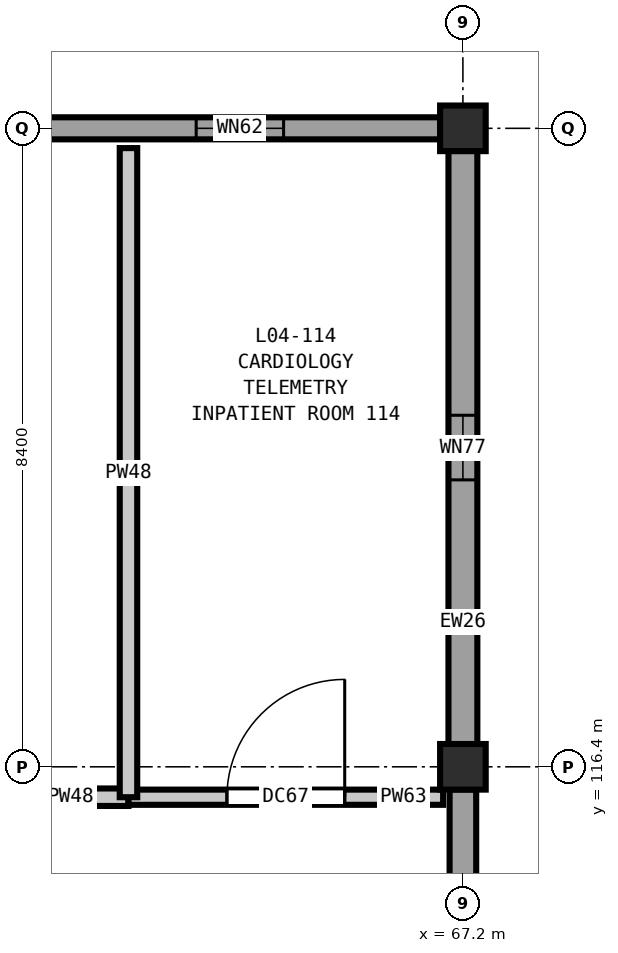
"""IFC4 building model, lengths in metres.
Left out: names, types, materials, properties, quantities, classifications, styles, units other than length and angle.
Written with IfcOpenShell. Run it as: python <this file> out.ifc"""

import sys

from ifc_helpers import new_model, si_unit, direction, frame, frame_2d, origin, origin_2d, place, context, subcontext, project, spatial, rectangle, extrude, element, fill, save


model = new_model("IFC4")
c1 = context("Model", 3, precision=1e-05, world=origin(), true_north=direction((0.0, 1.0)))
c2 = subcontext(c1, "Body", "Model", "MODEL_VIEW")
j1 = project(units=[si_unit("LENGTHUNIT", "METRE"), si_unit("PLANEANGLEUNIT", "RADIAN")], contexts=[c1])
p1 = place(None, origin())
s1 = spatial("IfcSite", under=j1, at=p1, CompositionType="ELEMENT")
p2 = place(p1, origin())
s2 = spatial("IfcBuilding", under=s1, at=p2, CompositionType="ELEMENT")
p3 = place(p2, frame((0.0, 0.0, 20.4)))
s3 = spatial("IfcBuildingStorey", under=s2, at=p3, CompositionType="ELEMENT", Elevation=20.4)
for number, where, z_axis, x_axis in (
    (1, (67.2, 116.4, 0.0), (0.0, 0.0, 1.0), (1.0, 0.0, 0.0)),
    (2, (67.2, 124.8, 0.0), (0.0, 0.0, 1.0), (1.0, 0.0, 0.0)),
):
    element("IfcColumn", number, at=place(p3, frame(where, z_axis=z_axis, x_axis=x_axis)), inside=s3, PredefinedType="COLUMN", context=c2, shape_type="SweptSolid", body=[
        extrude(rectangle(XDim=0.6, YDim=0.6, at=origin_2d()), origin(), (0.0, 0.0, 1.0), 4.2),
    ])
p4 = place(p3, frame((59.098, 124.8, 0.0), z_axis=(0.0, 0.0, 1.0), x_axis=(1.0, 0.0, 0.0)))
e3 = element("IfcWall", 3, at=p4, inside=s3, PredefinedType="SOLIDWALL", context=c2, shape_type="SweptSolid", body=[
    extrude(rectangle(XDim=7.804, YDim=0.29, at=frame_2d((3.902, 0.0))), origin(), (0.0, 0.0, 1.0), 3.48),
])
p5 = place(p4, frame((4.593, 0.0, 0.9)))
e4 = element("IfcOpeningElement", 4, at=p5, cuts=e3, PredefinedType="OPENING", context=c2, shape_type="SweptSolid", body=[
    extrude(rectangle(XDim=1.15, YDim=1.4, at=frame_2d((0.575, 0.7))), frame((0.0, 0.155, 0.0), z_axis=(0.0, -1.0, 0.0), x_axis=(1.0, 0.0, 0.0)), (0.0, 0.0, 1.0), 0.31),
])
p6 = place(p3, frame((67.2, 124.502, 0.0), z_axis=(0.0, 0.0, 1.0), x_axis=(0.0, -1.0, 0.0)))
e5 = element("IfcWall", 5, at=p6, inside=s3, PredefinedType="SOLIDWALL", context=c2, shape_type="SweptSolid", body=[
    extrude(rectangle(XDim=7.804, YDim=0.38, at=frame_2d((3.902, 0.0))), origin(), (0.0, 0.0, 1.0), 3.48),
])
p7 = place(p6, frame((3.477, 0.0, 0.9)))
e6 = element("IfcOpeningElement", 6, at=p7, cuts=e5, PredefinedType="OPENING", context=c2, shape_type="SweptSolid", body=[
    extrude(rectangle(XDim=0.85, YDim=1.4, at=frame_2d((0.425, 0.7))), frame((0.0, 0.2, 0.0), z_axis=(0.0, -1.0, 0.0), x_axis=(1.0, 0.0, 0.0)), (0.0, 0.0, 1.0), 0.4),
])
p8 = place(p3, frame((67.2, 116.102, 0.0), z_axis=(0.0, 0.0, 1.0), x_axis=(0.0, -1.0, 0.0)))
e7 = element("IfcWall", 7, at=p8, inside=s3, PredefinedType="SOLIDWALL", context=c2, shape_type="SweptSolid", body=[
    extrude(rectangle(XDim=6.604, YDim=0.35, at=frame_2d((3.302, 0.0))), origin(), (0.0, 0.0, 1.0), 3.48),
])
p9 = place(p8, frame((2.827, 0.0, 0.9)))
e8 = element("IfcOpeningElement", 8, at=p9, cuts=e7, PredefinedType="OPENING", context=c2, shape_type="SweptSolid", body=[
    extrude(rectangle(XDim=0.95, YDim=1.4, at=frame_2d((0.475, 0.7))), frame((0.0, 0.185, 0.0), z_axis=(0.0, -1.0, 0.0), x_axis=(1.0, 0.0, 0.0)), (0.0, 0.0, 1.0), 0.37),
])
p10 = place(p3, frame((57.8, 116.0, 0.0), z_axis=(0.0, 0.0, 1.0), x_axis=(1.0, 0.0, 0.0)))
e9 = element("IfcWall", 9, at=p10, inside=s3, PredefinedType="PARTITIONING", context=c2, shape_type="SweptSolid", body=[
    extrude(rectangle(XDim=5.0, YDim=0.23, at=frame_2d((2.5, 0.0))), origin(), (0.0, 0.0, 1.0), 3.82),
])
p11 = place(p10, frame((1.775, 0.0, 0.0)))
e10 = element("IfcOpeningElement", 10, at=p11, cuts=e9, PredefinedType="OPENING", context=c2, shape_type="SweptSolid", body=[
    extrude(rectangle(XDim=1.45, YDim=2.25, at=frame_2d((0.725, 1.125))), frame((0.0, 0.125, 0.0), z_axis=(0.0, -1.0, 0.0), x_axis=(1.0, 0.0, 0.0)), (0.0, 0.0, 1.0), 0.25),
])
p12 = place(p3, frame((62.8, 116.0, 0.0), z_axis=(0.0, 0.0, 1.0), x_axis=(1.0, 0.0, 0.0)))
e11 = element("IfcWall", 11, at=p12, inside=s3, PredefinedType="PARTITIONING", context=c2, shape_type="SweptSolid", body=[
    extrude(rectangle(XDim=4.14, YDim=0.2, at=frame_2d((2.07, 0.0))), origin(), (0.0, 0.0, 1.0), 3.82),
])
p13 = place(p12, frame((1.295, 0.0, 0.0)))
e12 = element("IfcOpeningElement", 12, at=p13, cuts=e11, PredefinedType="OPENING", context=c2, shape_type="SweptSolid", body=[
    extrude(rectangle(XDim=1.55, YDim=2.25, at=frame_2d((0.775, 1.125))), frame((0.0, 0.11, 0.0), z_axis=(0.0, -1.0, 0.0), x_axis=(1.0, 0.0, 0.0)), (0.0, 0.0, 1.0), 0.22),
])
p14 = place(p3, frame((62.8, 116.0, 0.0), z_axis=(0.0, 0.0, 1.0), x_axis=(0.0, 1.0, 0.0)))
e13 = element("IfcWall", 13, at=p14, inside=s3, PredefinedType="PARTITIONING", context=c2, shape_type="SweptSolid", body=[
    extrude(rectangle(XDim=8.54, YDim=0.23, at=frame_2d((4.27, 0.0))), origin(), (0.0, 0.0, 1.0), 3.82),
])
p15 = place(p5, origin())
e14 = element("IfcWindow", 14, at=p15, inside=s3, PartitioningType="SINGLE_PANEL", PredefinedType="WINDOW", context=c2, shape_type="SweptSolid", body=[
    extrude(rectangle(XDim=1.15, YDim=1.4, at=frame_2d((0.575, 0.7))), frame((0.0, 0.03, 0.0), z_axis=(0.0, -1.0, 0.0), x_axis=(1.0, 0.0, 0.0)), (0.0, 0.0, 1.0), 0.06),
])
fill(e4, e14)
p16 = place(p7, origin())
e15 = element("IfcWindow", 15, at=p16, inside=s3, PartitioningType="SINGLE_PANEL", PredefinedType="WINDOW", context=c2, shape_type="SweptSolid", body=[
    extrude(rectangle(XDim=0.85, YDim=1.4, at=frame_2d((0.425, 0.7))), frame((0.0, 0.03, 0.0), z_axis=(0.0, -1.0, 0.0), x_axis=(1.0, 0.0, 0.0)), (0.0, 0.0, 1.0), 0.06),
])
fill(e6, e15)
p17 = place(p13, origin())
e16 = element("IfcDoor", 16, at=p17, inside=s3, OperationType="SINGLE_SWING_RIGHT", PredefinedType="DOOR", context=c2, shape_type="SweptSolid", body=[
    extrude(rectangle(XDim=1.55, YDim=2.25, at=frame_2d((0.775, 1.125))), frame((0.0, 0.025, 0.0), z_axis=(0.0, -1.0, 0.0), x_axis=(1.0, 0.0, 0.0)), (0.0, 0.0, 1.0), 0.05),
])
fill(e12, e16)
save(model, sys.argv[1])
